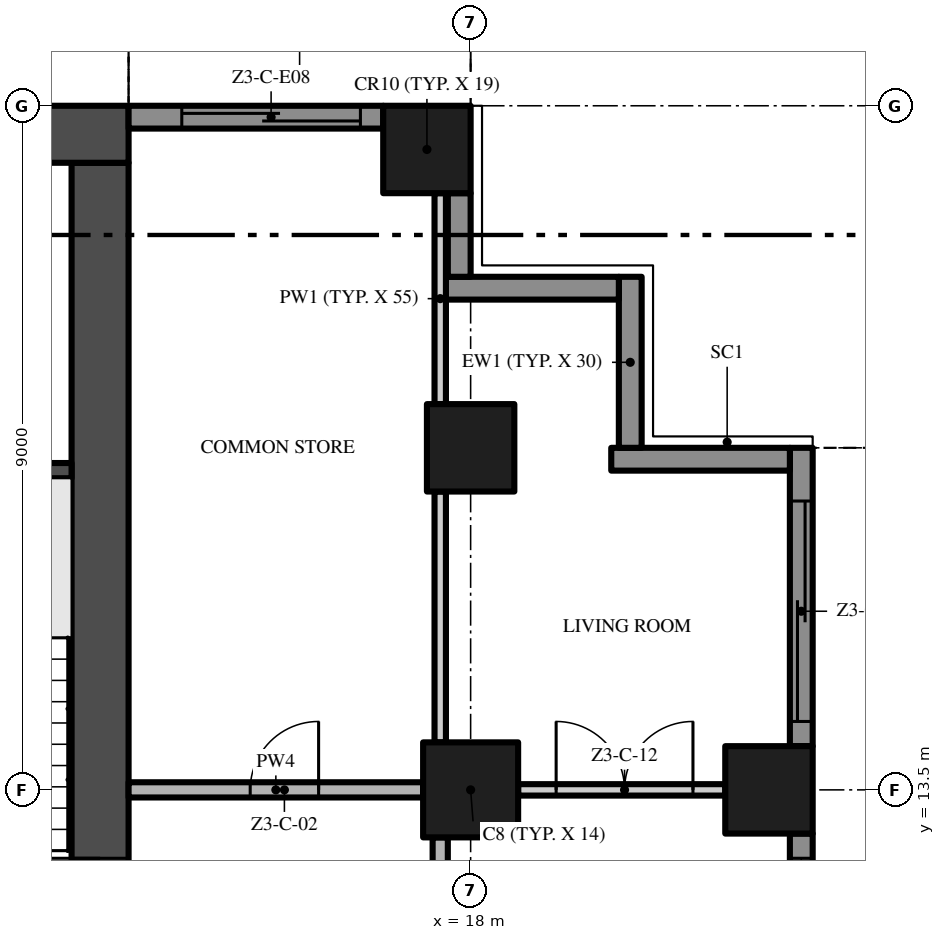
"""IFC4 building model, lengths in metres.
Left out: names, types, materials, properties, quantities, classifications, styles, units other than length and angle.
Written with IfcOpenShell. Run it as: python <this file> out.ifc"""

import sys

from ifc_helpers import new_model, si_unit, direction, frame, frame_2d, origin, origin_2d, place, context, subcontext, project, spatial, polyline, rectangle, outline, extrude, element, fill, save


model = new_model("IFC4")
c1 = context("Model", 3, precision=1e-05, world=origin(), true_north=direction((0.0, 1.0)))
c2 = subcontext(c1, "Body", "Model", "MODEL_VIEW")
j1 = project(units=[si_unit("LENGTHUNIT", "METRE"), si_unit("PLANEANGLEUNIT", "RADIAN")], contexts=[c1])
p1 = place(None, origin())
s1 = spatial("IfcSite", under=j1, at=p1, CompositionType="ELEMENT")
p2 = place(p1, origin())
s2 = spatial("IfcBuilding", under=s1, at=p2, CompositionType="ELEMENT")
p3 = place(p2, frame((0.0, 0.0, 151.6)))
s3 = spatial("IfcBuildingStorey", under=s2, at=p3, CompositionType="ELEMENT", Elevation=151.6)
p4 = place(p3, frame((13.125, 5.25, -0.3), z_axis=(0.0, 0.0, 1.0), x_axis=(0.0, 1.0, 0.0)))
e1 = element("IfcWall", 1, at=p4, inside=s3, PredefinedType="SHEAR", context=c2, shape_type="SweptSolid", body=[
    extrude(rectangle(XDim=16.5, YDim=0.75, at=frame_2d((8.25, 0.0))), origin(), (0.0, 0.0, 1.0), 3.8),
])
p5 = place(p4, frame((6.15, 0.0, 0.3)))
e2 = element("IfcOpeningElement", 2, at=p5, cuts=e1, PredefinedType="OPENING", context=c2, shape_type="SweptSolid", body=[
    extrude(rectangle(XDim=1.2, YDim=2.2, at=frame_2d((0.6, 1.1))), frame((0.0, 0.385, 0.0), z_axis=(0.0, -1.0, 0.0), x_axis=(1.0, 0.0, 0.0)), (0.0, 0.0, 1.0), 0.77),
])
p6 = place(p3, frame((13.5, 22.125, -0.3), z_axis=(0.0, 0.0, 1.0), x_axis=(-1.0, 0.0, 0.0)))
e3 = element("IfcWall", 3, at=p6, inside=s3, PredefinedType="SHEAR", context=c2, shape_type="SweptSolid", body=[
    extrude(rectangle(XDim=27.0, YDim=0.75, at=frame_2d((13.5, 0.0))), origin(), (0.0, 0.0, 1.0), 3.8),
])
p7 = place(p3, frame((18.0, 13.5, 0.0), z_axis=(0.0, 0.0, 1.0), x_axis=(1.0, 0.0, 0.0)))
e4 = element("IfcColumn", 4, at=p7, inside=s3, PredefinedType="COLUMN", context=c2, shape_type="SweptSolid", body=[
    extrude(rectangle(XDim=1.25, YDim=1.25, at=origin_2d()), origin(), (0.0, 0.0, 1.0), 3.5),
])
for number, where, z_axis, x_axis in (
    (5, (17.425, 21.925, 0.0), (0.0, 0.0, 1.0), (1.0, 0.0, 0.0)),
    (6, (21.925, 13.5, 0.0), (0.0, 0.0, 1.0), (1.0, 0.0, 0.0)),
    (7, (18.0, 18.0, 0.0), (0.0, 0.0, 1.0), (1.0, 0.0, 0.0)),
):
    element("IfcColumn", number, at=place(p3, frame(where, z_axis=z_axis, x_axis=x_axis)), inside=s3, PredefinedType="COLUMN", context=c2, shape_type="SweptSolid", body=[
        extrude(rectangle(XDim=1.15, YDim=1.15, at=origin_2d()), origin(), (0.0, 0.0, 1.0), 3.5),
    ])
p8 = place(p3, frame((22.35, 12.925, 0.0), z_axis=(0.0, 0.0, 1.0), x_axis=(0.0, -1.0, 0.0)))
e8 = element("IfcWall", 8, at=p8, inside=s3, PredefinedType="SOLIDWALL", context=c2, shape_type="SweptSolid", body=[
    extrude(rectangle(XDim=7.85, YDim=0.3, at=frame_2d((3.925, 0.0))), origin(), (0.0, 0.0, 1.0), 3.5),
])
p9 = place(p8, frame((4.625, 0.0, 0.45)))
e9 = element("IfcOpeningElement", 9, at=p9, cuts=e8, PredefinedType="OPENING", context=c2, shape_type="SweptSolid", body=[
    extrude(rectangle(XDim=2.9, YDim=2.65, at=frame_2d((1.45, 1.325))), frame((0.0, 0.16, 0.0), z_axis=(0.0, -1.0, 0.0), x_axis=(1.0, 0.0, 0.0)), (0.0, 0.0, 1.0), 0.32),
])
p10 = place(p8, frame((0.325, 0.0, 0.45)))
e10 = element("IfcOpeningElement", 10, at=p10, cuts=e8, PredefinedType="OPENING", context=c2, shape_type="SweptSolid", body=[
    extrude(rectangle(XDim=2.9, YDim=2.65, at=frame_2d((1.45, 1.325))), frame((0.0, 0.16, 0.0), z_axis=(0.0, -1.0, 0.0), x_axis=(1.0, 0.0, 0.0)), (0.0, 0.0, 1.0), 0.32),
])
p11 = place(p3, frame((22.35, 18.0, 0.0), z_axis=(0.0, 0.0, 1.0), x_axis=(0.0, -1.0, 0.0)))
e11 = element("IfcWall", 11, at=p11, inside=s3, PredefinedType="SOLIDWALL", context=c2, shape_type="SweptSolid", body=[
    extrude(rectangle(XDim=3.925, YDim=0.3, at=frame_2d((1.962, 0.0))), origin(), (0.0, 0.0, 1.0), 3.5),
])
p12 = place(p11, frame((0.7, 0.0, 0.0)))
e12 = element("IfcOpeningElement", 12, at=p12, cuts=e11, PredefinedType="OPENING", context=c2, shape_type="SweptSolid", body=[
    extrude(rectangle(XDim=2.9, YDim=2.4, at=frame_2d((1.45, 1.2))), frame((0.0, 0.16, 0.0), z_axis=(0.0, -1.0, 0.0), x_axis=(1.0, 0.0, 0.0)), (0.0, 0.0, 1.0), 0.32),
])
p13 = place(p3, frame((19.85, 17.85, 0.0), z_axis=(0.0, 0.0, 1.0), x_axis=(1.0, 0.0, 0.0)))
e13 = element("IfcWall", 13, at=p13, inside=s3, PredefinedType="SOLIDWALL", context=c2, shape_type="SweptSolid", body=[
    extrude(rectangle(XDim=2.35, YDim=0.3, at=frame_2d((1.175, 0.0))), origin(), (0.0, 0.0, 1.0), 3.5),
])
p14 = place(p3, frame((20.1, 20.25, 0.0), z_axis=(0.0, 0.0, 1.0), x_axis=(0.0, -1.0, 0.0)))
e14 = element("IfcWall", 14, at=p14, inside=s3, PredefinedType="SOLIDWALL", context=c2, shape_type="SweptSolid", body=[
    extrude(rectangle(XDim=2.25, YDim=0.3, at=frame_2d((1.125, 0.0))), origin(), (0.0, 0.0, 1.0), 3.5),
])
p15 = place(p3, frame((17.6, 20.1, 0.0), z_axis=(0.0, 0.0, 1.0), x_axis=(1.0, 0.0, 0.0)))
e15 = element("IfcWall", 15, at=p15, inside=s3, PredefinedType="SOLIDWALL", context=c2, shape_type="SweptSolid", body=[
    extrude(rectangle(XDim=2.35, YDim=0.3, at=frame_2d((1.175, 0.0))), origin(), (0.0, 0.0, 1.0), 3.5),
])
p16 = place(p3, frame((17.85, 21.35, 0.0), z_axis=(0.0, 0.0, 1.0), x_axis=(0.0, -1.0, 0.0)))
e16 = element("IfcWall", 16, at=p16, inside=s3, PredefinedType="SOLIDWALL", context=c2, shape_type="SweptSolid", body=[
    extrude(rectangle(XDim=1.1, YDim=0.3, at=frame_2d((0.55, 0.0))), origin(), (0.0, 0.0, 1.0), 3.5),
])
p17 = place(p3, frame((13.5, 22.35, 0.0), z_axis=(0.0, 0.0, 1.0), x_axis=(1.0, 0.0, 0.0)))
e17 = element("IfcWall", 17, at=p17, inside=s3, PredefinedType="SOLIDWALL", context=c2, shape_type="SweptSolid", body=[
    extrude(rectangle(XDim=3.35, YDim=0.3, at=frame_2d((1.675, 0.0))), origin(), (0.0, 0.0, 1.0), 3.5),
])
p18 = place(p17, frame((0.7, 0.0, 0.0)))
e18 = element("IfcOpeningElement", 18, at=p18, cuts=e17, PredefinedType="OPENING", context=c2, shape_type="SweptSolid", body=[
    extrude(rectangle(XDim=2.35, YDim=2.4, at=frame_2d((1.175, 1.2))), frame((0.0, 0.16, 0.0), z_axis=(0.0, -1.0, 0.0), x_axis=(1.0, 0.0, 0.0)), (0.0, 0.0, 1.0), 0.32),
])
p19 = place(p3, origin())
e19 = element("IfcWall", 19, at=p19, inside=s3, PredefinedType="USERDEFINED", context=c2, shape_type="SweptSolid", body=[
    extrude(outline(polyline([(25.5, -13.5), (25.271, -12.0), (24.671, -10.5), (23.929, -9.0), (23.329, -7.5), (23.1, -6.0), (23.329, -4.5), (23.929, -3.0), (24.671, -1.5), (25.271, 0.0), (25.5, 1.5), (25.271, 3.0), (24.671, 4.5), (23.929, 6.0), (23.329, 7.5), (23.1, 9.0), (23.329, 10.5), (23.929, 12.0), (24.671, 13.5), (25.271, 15.0), (25.5, 16.5), (25.271, 18.0), (25.024, 17.962), (25.247, 16.5), (25.028, 15.066), (24.442, 13.602), (23.701, 12.102), (23.086, 10.566), (22.847, 9.0), (23.086, 7.434), (23.701, 5.898), (24.442, 4.398), (25.028, 2.934), (25.247, 1.5), (25.028, 0.066), (24.442, -1.398), (23.701, -2.898), (23.086, -4.434), (22.847, -6.0), (23.086, -7.566), (23.701, -9.102), (24.442, -10.602), (25.028, -12.066), (25.253, -13.538), (25.5, -13.5)])), origin(), (0.0, 0.0, 1.0), 0.9),
])
p20 = place(p3, frame((9.65, 17.7, 0.0), z_axis=(0.0, 0.0, 1.0), x_axis=(1.0, 0.0, 0.0)))
e20 = element("IfcWall", 20, at=p20, inside=s3, PredefinedType="SHEAR", context=c2, shape_type="SweptSolid", body=[
    extrude(rectangle(XDim=3.1, YDim=0.2, at=frame_2d((1.55, 0.0))), origin(), (0.0, 0.0, 1.0), 3.5),
])
p21 = place(p3, frame((13.5, 13.5, 0.0), z_axis=(0.0, 0.0, 1.0), x_axis=(1.0, 0.0, 0.0)))
e21 = element("IfcWall", 21, at=p21, inside=s3, PredefinedType="PARTITIONING", context=c2, shape_type="SweptSolid", body=[
    extrude(rectangle(XDim=3.875, YDim=0.2, at=frame_2d((1.938, 0.0))), origin(), (0.0, 0.0, 1.0), 3.5),
])
p22 = place(p21, frame((1.6, 0.0, 0.0)))
e22 = element("IfcOpeningElement", 22, at=p22, cuts=e21, PredefinedType="OPENING", context=c2, shape_type="SweptSolid", body=[
    extrude(rectangle(XDim=0.9, YDim=2.1, at=frame_2d((0.45, 1.05))), frame((0.0, 0.11, 0.0), z_axis=(0.0, -1.0, 0.0), x_axis=(1.0, 0.0, 0.0)), (0.0, 0.0, 1.0), 0.22),
])
p23 = place(p3, frame((18.625, 13.5, 0.0), z_axis=(0.0, 0.0, 1.0), x_axis=(1.0, 0.0, 0.0)))
e23 = element("IfcWall", 23, at=p23, inside=s3, PredefinedType="PARTITIONING", context=c2, shape_type="SweptSolid", body=[
    extrude(rectangle(XDim=2.725, YDim=0.15, at=frame_2d((1.363, 0.0))), origin(), (0.0, 0.0, 1.0), 3.5),
])
p24 = place(p23, frame((0.5, 0.0, 0.0)))
e24 = element("IfcOpeningElement", 24, at=p24, cuts=e23, PredefinedType="OPENING", context=c2, shape_type="SweptSolid", body=[
    extrude(rectangle(XDim=1.8, YDim=2.4, at=frame_2d((0.9, 1.2))), frame((0.0, 0.085, 0.0), z_axis=(0.0, -1.0, 0.0), x_axis=(1.0, 0.0, 0.0)), (0.0, 0.0, 1.0), 0.17),
])
p25 = place(p3, frame((17.6, 12.875, 0.0), z_axis=(0.0, 0.0, 1.0), x_axis=(0.0, -1.0, 0.0)))
e25 = element("IfcWall", 25, at=p25, inside=s3, PredefinedType="PARTITIONING", context=c2, shape_type="SweptSolid", body=[
    extrude(rectangle(XDim=7.75, YDim=0.2, at=frame_2d((3.875, 0.0))), origin(), (0.0, 0.0, 1.0), 3.5),
])
p26 = place(p25, frame((5.55, 0.0, 0.0)))
e26 = element("IfcOpeningElement", 26, at=p26, cuts=e25, PredefinedType="OPENING", context=c2, shape_type="SweptSolid", body=[
    extrude(rectangle(XDim=1.2, YDim=2.4, at=frame_2d((0.6, 1.2))), frame((0.0, 0.11, 0.0), z_axis=(0.0, -1.0, 0.0), x_axis=(1.0, 0.0, 0.0)), (0.0, 0.0, 1.0), 0.22),
])
p27 = place(p3, frame((17.6, 14.125, 0.0), z_axis=(0.0, 0.0, 1.0), x_axis=(0.0, 1.0, 0.0)))
e27 = element("IfcWall", 27, at=p27, inside=s3, PredefinedType="PARTITIONING", context=c2, shape_type="SweptSolid", body=[
    extrude(rectangle(XDim=3.3, YDim=0.15, at=frame_2d((1.65, 0.0))), origin(), (0.0, 0.0, 1.0), 3.5),
])
p28 = place(p3, frame((17.6, 18.575, 0.0), z_axis=(0.0, 0.0, 1.0), x_axis=(0.0, 1.0, 0.0)))
e28 = element("IfcWall", 28, at=p28, inside=s3, PredefinedType="PARTITIONING", context=c2, shape_type="SweptSolid", body=[
    extrude(rectangle(XDim=2.775, YDim=0.15, at=frame_2d((1.387, 0.0))), origin(), (0.0, 0.0, 1.0), 3.5),
])
p29 = place(p10, origin())
e29 = element("IfcWindow", 29, at=p29, inside=s3, PartitioningType="SINGLE_PANEL", PredefinedType="WINDOW", context=c2, shape_type="SweptSolid", body=[
    extrude(rectangle(XDim=2.9, YDim=2.65, at=frame_2d((1.45, 1.325))), frame((0.0, 0.03, 0.0), z_axis=(0.0, -1.0, 0.0), x_axis=(1.0, 0.0, 0.0)), (0.0, 0.0, 1.0), 0.06),
])
fill(e10, e29)
p30 = place(p12, origin())
e30 = element("IfcDoor", 30, at=p30, inside=s3, OperationType="SINGLE_SWING_LEFT", PredefinedType="DOOR", context=c2, shape_type="SweptSolid", body=[
    extrude(rectangle(XDim=2.9, YDim=2.4, at=frame_2d((1.45, 1.2))), frame((0.0, 0.025, 0.0), z_axis=(0.0, -1.0, 0.0), x_axis=(1.0, 0.0, 0.0)), (0.0, 0.0, 1.0), 0.05),
])
fill(e12, e30)
p31 = place(p18, origin())
e31 = element("IfcDoor", 31, at=p31, inside=s3, OperationType="SINGLE_SWING_LEFT", PredefinedType="DOOR", context=c2, shape_type="SweptSolid", body=[
    extrude(rectangle(XDim=2.35, YDim=2.4, at=frame_2d((1.175, 1.2))), frame((0.0, 0.025, 0.0), z_axis=(0.0, -1.0, 0.0), x_axis=(1.0, 0.0, 0.0)), (0.0, 0.0, 1.0), 0.05),
])
fill(e18, e31)
p32 = place(p5, frame((1.2, 0.0, 0.0), z_axis=(0.0, 0.0, 1.0), x_axis=(-1.0, 0.0, 0.0)))
e32 = element("IfcDoor", 32, at=p32, inside=s3, OperationType="SINGLE_SWING_LEFT", PredefinedType="DOOR", context=c2, shape_type="SweptSolid", body=[
    extrude(rectangle(XDim=1.2, YDim=2.2, at=frame_2d((0.6, 1.1))), frame((0.0, 0.025, 0.0), z_axis=(0.0, -1.0, 0.0), x_axis=(1.0, 0.0, 0.0)), (0.0, 0.0, 1.0), 0.05),
])
fill(e2, e32)
p33 = place(p22, origin())
e33 = element("IfcDoor", 33, at=p33, inside=s3, OperationType="SINGLE_SWING_RIGHT", PredefinedType="DOOR", context=c2, shape_type="SweptSolid", body=[
    extrude(rectangle(XDim=0.9, YDim=2.1, at=frame_2d((0.45, 1.05))), frame((0.0, 0.025, 0.0), z_axis=(0.0, -1.0, 0.0), x_axis=(1.0, 0.0, 0.0)), (0.0, 0.0, 1.0), 0.05),
])
fill(e22, e33)
p34 = place(p24, origin())
e34 = element("IfcDoor", 34, at=p34, inside=s3, OperationType="DOUBLE_DOOR_SINGLE_SWING", PredefinedType="DOOR", context=c2, shape_type="SweptSolid", body=[
    extrude(rectangle(XDim=1.8, YDim=2.4, at=frame_2d((0.9, 1.2))), frame((0.0, 0.025, 0.0), z_axis=(0.0, -1.0, 0.0), x_axis=(1.0, 0.0, 0.0)), (0.0, 0.0, 1.0), 0.05),
])
fill(e24, e34)
save(model, sys.argv[1])
